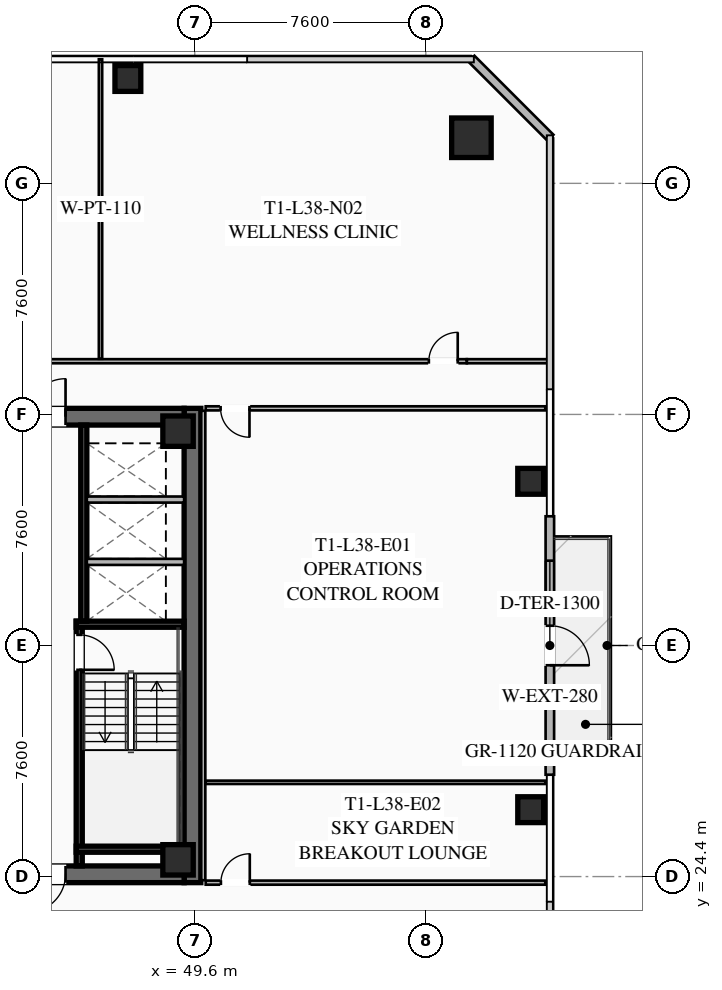
"""IFC4 building model, lengths in metres.
Left out: names, types, materials, properties, quantities, classifications, styles, units other than length and angle.
Written with IfcOpenShell. Run it as: python <this file> out.ifc"""

import sys

from ifc_helpers import new_model, si_unit, direction, frame, frame_2d, origin, origin_2d, place, context, subcontext, project, spatial, rectangle, hollow_rectangle, extrude, element, fill, save


model = new_model("IFC4")
c1 = context("Model", 3, precision=1e-05, world=origin(), true_north=direction((0.0, 1.0)))
c2 = subcontext(c1, "Body", "Model", "MODEL_VIEW")
j1 = project(units=[si_unit("LENGTHUNIT", "METRE"), si_unit("PLANEANGLEUNIT", "RADIAN")], contexts=[c1])
p1 = place(None, origin())
s1 = spatial("IfcSite", under=j1, at=p1, CompositionType="ELEMENT")
p2 = place(p1, origin())
s2 = spatial("IfcBuilding", under=s1, at=p2, CompositionType="ELEMENT")
p3 = place(p2, frame((0.0, 0.0, 142.8)))
s3 = spatial("IfcBuildingStorey", under=s2, at=p3, CompositionType="ELEMENT", Elevation=142.8)
p4 = place(p3, frame((49.525, 39.8, 0.0), z_axis=(0.0, 0.0, 1.0), x_axis=(0.0, -1.0, 0.0)))
e1 = element("IfcWall", 1, at=p4, inside=s3, PredefinedType="SHEAR", context=c2, shape_type="SweptSolid", body=[
    extrude(rectangle(XDim=15.6, YDim=0.55, at=frame_2d((7.8, 0.0))), origin(), (0.0, 0.0, 1.0), 3.55),
])
p5 = place(p3, frame((49.25, 24.475, 0.0), z_axis=(0.0, 0.0, 1.0), x_axis=(-1.0, 0.0, 0.0)))
e2 = element("IfcWall", 2, at=p5, inside=s3, PredefinedType="SHEAR", context=c2, shape_type="SweptSolid", body=[
    extrude(rectangle(XDim=14.5, YDim=0.55, at=frame_2d((7.25, 0.0))), origin(), (0.0, 0.0, 1.0), 3.55),
])
p6 = place(p5, frame((8.95, 0.0, 0.0)))
e3 = element("IfcOpeningElement", 3, at=p6, cuts=e2, PredefinedType="OPENING", context=c2, shape_type="SweptSolid", body=[
    extrude(rectangle(XDim=1.25, YDim=2.25, at=frame_2d((0.625, 1.125))), frame((0.0, 0.285, 0.0), z_axis=(0.0, -1.0, 0.0), x_axis=(1.0, 0.0, 0.0)), (0.0, 0.0, 1.0), 0.57),
])
p7 = place(p5, frame((3.9, 0.0, 0.0)))
e4 = element("IfcOpeningElement", 4, at=p7, cuts=e2, PredefinedType="OPENING", context=c2, shape_type="SweptSolid", body=[
    extrude(rectangle(XDim=1.25, YDim=2.25, at=frame_2d((0.625, 1.125))), frame((0.0, 0.285, 0.0), z_axis=(0.0, -1.0, 0.0), x_axis=(1.0, 0.0, 0.0)), (0.0, 0.0, 1.0), 0.57),
])
p8 = place(p3, frame((34.75, 39.525, 0.0), z_axis=(0.0, 0.0, 1.0), x_axis=(1.0, 0.0, 0.0)))
e5 = element("IfcWall", 5, at=p8, inside=s3, PredefinedType="SHEAR", context=c2, shape_type="SweptSolid", body=[
    extrude(rectangle(XDim=14.5, YDim=0.55, at=frame_2d((7.25, 0.0))), origin(), (0.0, 0.0, 1.0), 3.55),
])
p9 = place(p8, frame((4.3, 0.0, 0.0)))
e6 = element("IfcOpeningElement", 6, at=p9, cuts=e5, PredefinedType="OPENING", context=c2, shape_type="SweptSolid", body=[
    extrude(rectangle(XDim=1.25, YDim=2.25, at=frame_2d((0.625, 1.125))), frame((0.0, 0.285, 0.0), z_axis=(0.0, -1.0, 0.0), x_axis=(1.0, 0.0, 0.0)), (0.0, 0.0, 1.0), 0.57),
])
p10 = place(p8, frame((9.35, 0.0, 0.0)))
e7 = element("IfcOpeningElement", 7, at=p10, cuts=e5, PredefinedType="OPENING", context=c2, shape_type="SweptSolid", body=[
    extrude(rectangle(XDim=1.25, YDim=2.25, at=frame_2d((0.625, 1.125))), frame((0.0, 0.285, 0.0), z_axis=(0.0, -1.0, 0.0), x_axis=(1.0, 0.0, 0.0)), (0.0, 0.0, 1.0), 0.57),
])
for number, where, z_axis, x_axis in (
    (8, (49.05, 24.95, 0.0), (0.0, 0.0, 1.0), (1.0, 0.0, 0.0)),
    (9, (49.05, 39.05, 0.0), (0.0, 0.0, 1.0), (1.0, 0.0, 0.0)),
):
    element("IfcColumn", number, at=place(p3, frame(where, z_axis=z_axis, x_axis=x_axis)), inside=s3, PredefinedType="COLUMN", context=c2, shape_type="SweptSolid", body=[
        extrude(hollow_rectangle(XDim=1.0, YDim=1.0, WallThickness=0.04, at=origin_2d()), origin(), (0.0, 0.0, 1.0), 3.37),
    ])
p11 = place(p3, frame((58.7, 48.7, 0.0), z_axis=(0.0, 0.0, 1.0), x_axis=(1.0, 0.0, 0.0)))
e10 = element("IfcColumn", 10, at=p11, inside=s3, PredefinedType="COLUMN", context=c2, shape_type="SweptSolid", body=[
    extrude(hollow_rectangle(XDim=1.3, YDim=1.3, WallThickness=0.05, at=origin_2d()), origin(), (0.0, 0.0, 1.0), 3.37),
])
for number, where, z_axis, x_axis in (
    (11, (60.65, 26.6, 0.0), (0.0, 0.0, 1.0), (1.0, 0.0, 0.0)),
    (12, (60.65, 37.4, 0.0), (0.0, 0.0, 1.0), (1.0, 0.0, 0.0)),
    (13, (47.4, 50.65, 0.0), (0.0, 0.0, 1.0), (1.0, 0.0, 0.0)),
):
    element("IfcColumn", number, at=place(p3, frame(where, z_axis=z_axis, x_axis=x_axis)), inside=s3, PredefinedType="COLUMN", context=c2, shape_type="SweptSolid", body=[
        extrude(hollow_rectangle(XDim=0.85, YDim=0.85, WallThickness=0.035, at=origin_2d()), origin(), (0.0, 0.0, 1.0), 3.37),
    ])
p12 = place(p3, frame((61.28, 36.25, 0.0), z_axis=(0.0, 0.0, 1.0), x_axis=(0.0, -1.0, 0.0)))
e14 = element("IfcWall", 14, at=p12, inside=s3, PredefinedType="SOLIDWALL", context=c2, shape_type="SweptSolid", body=[
    extrude(rectangle(XDim=8.5, YDim=0.28, at=frame_2d((4.25, 0.0))), origin(), (0.0, 0.0, 1.0), 3.37),
])
p13 = place(p12, frame((3.6, 0.0, 0.0)))
e15 = element("IfcOpeningElement", 15, at=p13, cuts=e14, PredefinedType="OPENING", context=c2, shape_type="SweptSolid", body=[
    extrude(rectangle(XDim=1.3, YDim=2.15, at=frame_2d((0.65, 1.075))), frame((0.0, 0.15, 0.0), z_axis=(0.0, -1.0, 0.0), x_axis=(1.0, 0.0, 0.0)), (0.0, 0.0, 1.0), 0.3),
])
p14 = place(p12, frame((1.46, 0.0, 0.85)))
e16 = element("IfcOpeningElement", 16, at=p14, cuts=e14, PredefinedType="OPENING", context=c2, shape_type="SweptSolid", body=[
    extrude(rectangle(XDim=1.8, YDim=1.92, at=frame_2d((0.9, 0.96))), frame((0.0, 0.15, 0.0), z_axis=(0.0, -1.0, 0.0), x_axis=(1.0, 0.0, 0.0)), (0.0, 0.0, 1.0), 0.3),
])
p15 = place(p3, frame((58.7, 51.3, 0.0), z_axis=(0.0, 0.0, 1.0), x_axis=(0.707106781187, -0.707106781187, 0.0)))
e17 = element("IfcWall", 17, at=p15, inside=s3, PredefinedType="SOLIDWALL", context=c2, shape_type="SweptSolid", body=[
    extrude(rectangle(XDim=3.677, YDim=0.28, at=frame_2d((1.838, 0.0))), origin(), (0.0, 0.0, 1.0), 3.37),
])
p16 = place(p3, frame((45.8, 32.8, 0.0), z_axis=(0.0, 0.0, 1.0), x_axis=(0.0, -1.0, 0.0)))
e18 = element("IfcWall", 18, at=p16, inside=s3, PredefinedType="SHEAR", context=c2, shape_type="SweptSolid", body=[
    extrude(rectangle(XDim=8.05, YDim=0.2, at=frame_2d((4.025, 0.0))), origin(), (0.0, 0.0, 1.0), 3.37),
])
p17 = place(p16, frame((0.45, 0.0, 0.0)))
e19 = element("IfcOpeningElement", 19, at=p17, cuts=e18, PredefinedType="OPENING", context=c2, shape_type="SweptSolid", body=[
    extrude(rectangle(XDim=1.15, YDim=2.2, at=frame_2d((0.575, 1.1))), frame((0.0, 0.11, 0.0), z_axis=(0.0, -1.0, 0.0), x_axis=(1.0, 0.0, 0.0)), (0.0, 0.0, 1.0), 0.22),
])
for number, where, z_axis, x_axis in (
    (20, (45.7, 32.7, 0.0), (0.0, 0.0, 1.0), (1.0, 0.0, 0.0)),
    (21, (45.7, 25.3, 0.0), (0.0, 0.0, 1.0), (1.0, 0.0, 0.0)),
):
    element("IfcWall", number, at=place(p3, frame(where, z_axis=z_axis, x_axis=x_axis)), inside=s3, PredefinedType="SHEAR", context=c2, shape_type="SweptSolid", body=[
        extrude(rectangle(XDim=3.55, YDim=0.2, at=frame_2d((1.775, 0.0))), origin(), (0.0, 0.0, 1.0), 3.37),
    ])
p18 = place(p3, frame((45.95, 39.25, 0.0), z_axis=(0.0, 0.0, 1.0), x_axis=(0.0, -1.0, 0.0)))
e22 = element("IfcWall", 22, at=p18, inside=s3, PredefinedType="SHEAR", context=c2, shape_type="SweptSolid", body=[
    extrude(rectangle(XDim=6.45, YDim=0.2, at=frame_2d((3.225, 0.0))), origin(), (0.0, 0.0, 1.0), 3.37),
])
for number, where, z_axis, x_axis in (
    (23, (46.05, 34.75, 0.0), (0.0, 0.0, 1.0), (1.0, 0.0, 0.0)),
    (24, (46.05, 36.8, 0.0), (0.0, 0.0, 1.0), (1.0, 0.0, 0.0)),
):
    element("IfcWall", number, at=place(p3, frame(where, z_axis=z_axis, x_axis=x_axis)), inside=s3, PredefinedType="SOLIDWALL", context=c2, shape_type="SweptSolid", body=[
        extrude(rectangle(XDim=3.2, YDim=0.2, at=frame_2d((1.6, 0.0))), origin(), (0.0, 0.0, 1.0), 3.37),
    ])
p19 = place(p3, frame((25.45, 41.35, 0.0), z_axis=(0.0, 0.0, 1.0), x_axis=(1.0, 0.0, 0.0)))
e25 = element("IfcWall", 25, at=p19, inside=s3, PredefinedType="PARTITIONING", context=c2, shape_type="SweptSolid", body=[
    extrude(rectangle(XDim=33.1, YDim=0.135, at=frame_2d((16.55, 0.0))), origin(), (0.0, 0.0, 1.0), 2.723),
])
p20 = place(p19, frame((0.3, 0.0, 0.0)))
e26 = element("IfcOpeningElement", 26, at=p20, cuts=e25, PredefinedType="OPENING", context=c2, shape_type="SweptSolid", body=[
    extrude(rectangle(XDim=0.95, YDim=2.05, at=frame_2d((0.475, 1.025))), frame((0.0, 0.077, 0.0), z_axis=(0.0, -1.0, 0.0), x_axis=(1.0, 0.0, 0.0)), (0.0, 0.0, 1.0), 0.155),
])
p21 = place(p19, frame((31.85, 0.0, 0.0)))
e27 = element("IfcOpeningElement", 27, at=p21, cuts=e25, PredefinedType="OPENING", context=c2, shape_type="SweptSolid", body=[
    extrude(rectangle(XDim=0.95, YDim=2.05, at=frame_2d((0.475, 1.025))), frame((0.0, 0.077, 0.0), z_axis=(0.0, -1.0, 0.0), x_axis=(1.0, 0.0, 0.0)), (0.0, 0.0, 1.0), 0.155),
])
p22 = place(p3, frame((58.55, 41.35, 0.0), z_axis=(0.0, 0.0, 1.0), x_axis=(1.0, 0.0, 0.0)))
e28 = element("IfcWall", 28, at=p22, inside=s3, PredefinedType="PARTITIONING", context=c2, shape_type="SweptSolid", body=[
    extrude(rectangle(XDim=2.73, YDim=0.135, at=frame_2d((1.365, 0.0))), origin(), (0.0, 0.0, 1.0), 2.723),
])
p23 = place(p3, frame((46.5, 41.43, 0.0), z_axis=(0.0, 0.0, 1.0), x_axis=(0.0, 1.0, 0.0)))
e29 = element("IfcWall", 29, at=p23, inside=s3, PredefinedType="PARTITIONING", context=c2, shape_type="SweptSolid", body=[
    extrude(rectangle(XDim=9.85, YDim=0.11, at=frame_2d((4.925, 0.0))), origin(), (0.0, 0.0, 1.0), 2.723),
])
p24 = place(p3, frame((49.88, 39.72, 0.0), z_axis=(0.0, 0.0, 1.0), x_axis=(0.0, -1.0, 0.0)))
e30 = element("IfcWall", 30, at=p24, inside=s3, PredefinedType="PARTITIONING", context=c2, shape_type="SweptSolid", body=[
    extrude(rectangle(XDim=15.44, YDim=0.135, at=frame_2d((7.72, 0.0))), origin(), (0.0, 0.0, 1.0), 2.723),
])
p25 = place(p3, frame((61.13, 39.8, 0.0), z_axis=(0.0, 0.0, 1.0), x_axis=(-1.0, 0.0, 0.0)))
e31 = element("IfcWall", 31, at=p25, inside=s3, PredefinedType="PARTITIONING", context=c2, shape_type="SweptSolid", body=[
    extrude(rectangle(XDim=11.17, YDim=0.135, at=frame_2d((5.585, 0.0))), origin(), (0.0, 0.0, 1.0), 2.723),
])
p26 = place(p25, frame((9.73, 0.0, 0.0)))
e32 = element("IfcOpeningElement", 32, at=p26, cuts=e31, PredefinedType="OPENING", context=c2, shape_type="SweptSolid", body=[
    extrude(rectangle(XDim=0.95, YDim=2.05, at=frame_2d((0.475, 1.025))), frame((0.0, 0.077, 0.0), z_axis=(0.0, -1.0, 0.0), x_axis=(1.0, 0.0, 0.0)), (0.0, 0.0, 1.0), 0.155),
])
p27 = place(p3, frame((49.96, 24.2, 0.0), z_axis=(0.0, 0.0, 1.0), x_axis=(1.0, 0.0, 0.0)))
e33 = element("IfcWall", 33, at=p27, inside=s3, PredefinedType="PARTITIONING", context=c2, shape_type="SweptSolid", body=[
    extrude(rectangle(XDim=11.17, YDim=0.135, at=frame_2d((5.585, 0.0))), origin(), (0.0, 0.0, 1.0), 2.723),
])
p28 = place(p27, frame((0.5, 0.0, 0.0)))
e34 = element("IfcOpeningElement", 34, at=p28, cuts=e33, PredefinedType="OPENING", context=c2, shape_type="SweptSolid", body=[
    extrude(rectangle(XDim=0.95, YDim=2.05, at=frame_2d((0.475, 1.025))), frame((0.0, 0.077, 0.0), z_axis=(0.0, -1.0, 0.0), x_axis=(1.0, 0.0, 0.0)), (0.0, 0.0, 1.0), 0.155),
])
p29 = place(p3, frame((49.96, 27.5, 0.0), z_axis=(0.0, 0.0, 1.0), x_axis=(1.0, 0.0, 0.0)))
e35 = element("IfcWall", 35, at=p29, inside=s3, PredefinedType="PARTITIONING", context=c2, shape_type="SweptSolid", body=[
    extrude(rectangle(XDim=11.17, YDim=0.11, at=frame_2d((5.585, 0.0))), origin(), (0.0, 0.0, 1.0), 2.723),
])
p30 = place(p13, origin())
e36 = element("IfcDoor", 36, at=p30, inside=s3, OperationType="SINGLE_SWING_RIGHT", PredefinedType="DOOR", context=c2, shape_type="SweptSolid", body=[
    extrude(rectangle(XDim=1.3, YDim=2.15, at=frame_2d((0.65, 1.075))), frame((0.0, 0.025, 0.0), z_axis=(0.0, -1.0, 0.0), x_axis=(1.0, 0.0, 0.0)), (0.0, 0.0, 1.0), 0.05),
])
fill(e15, e36)
p31 = place(p14, origin())
e37 = element("IfcWindow", 37, at=p31, inside=s3, PartitioningType="SINGLE_PANEL", PredefinedType="WINDOW", context=c2, shape_type="SweptSolid", body=[
    extrude(rectangle(XDim=1.8, YDim=1.92, at=frame_2d((0.9, 0.96))), frame((0.0, 0.03, 0.0), z_axis=(0.0, -1.0, 0.0), x_axis=(1.0, 0.0, 0.0)), (0.0, 0.0, 1.0), 0.06),
])
fill(e16, e37)
p32 = place(p10, origin())
e38 = element("IfcDoor", 38, at=p32, inside=s3, OperationType="SINGLE_SWING_RIGHT", PredefinedType="DOOR", context=c2, shape_type="SweptSolid", body=[
    extrude(rectangle(XDim=1.25, YDim=2.25, at=frame_2d((0.625, 1.125))), frame((0.0, 0.025, 0.0), z_axis=(0.0, -1.0, 0.0), x_axis=(1.0, 0.0, 0.0)), (0.0, 0.0, 1.0), 0.05),
])
fill(e7, e38)
p33 = place(p7, origin())
e39 = element("IfcDoor", 39, at=p33, inside=s3, OperationType="SINGLE_SWING_RIGHT", PredefinedType="DOOR", context=c2, shape_type="SweptSolid", body=[
    extrude(rectangle(XDim=1.25, YDim=2.25, at=frame_2d((0.625, 1.125))), frame((0.0, 0.025, 0.0), z_axis=(0.0, -1.0, 0.0), x_axis=(1.0, 0.0, 0.0)), (0.0, 0.0, 1.0), 0.05),
])
fill(e4, e39)
p34 = place(p17, origin())
e40 = element("IfcDoor", 40, at=p34, inside=s3, OperationType="SINGLE_SWING_RIGHT", PredefinedType="DOOR", context=c2, shape_type="SweptSolid", body=[
    extrude(rectangle(XDim=1.15, YDim=2.2, at=frame_2d((0.575, 1.1))), frame((0.0, 0.025, 0.0), z_axis=(0.0, -1.0, 0.0), x_axis=(1.0, 0.0, 0.0)), (0.0, 0.0, 1.0), 0.05),
])
fill(e19, e40)
p35 = place(p21, origin())
e41 = element("IfcDoor", 41, at=p35, inside=s3, OperationType="SINGLE_SWING_RIGHT", PredefinedType="DOOR", context=c2, shape_type="SweptSolid", body=[
    extrude(rectangle(XDim=0.95, YDim=2.05, at=frame_2d((0.475, 1.025))), frame((0.0, 0.025, 0.0), z_axis=(0.0, -1.0, 0.0), x_axis=(1.0, 0.0, 0.0)), (0.0, 0.0, 1.0), 0.05),
])
fill(e27, e41)
p36 = place(p26, origin())
e42 = element("IfcDoor", 42, at=p36, inside=s3, OperationType="SINGLE_SWING_LEFT", PredefinedType="DOOR", context=c2, shape_type="SweptSolid", body=[
    extrude(rectangle(XDim=0.95, YDim=2.05, at=frame_2d((0.475, 1.025))), frame((0.0, 0.025, 0.0), z_axis=(0.0, -1.0, 0.0), x_axis=(1.0, 0.0, 0.0)), (0.0, 0.0, 1.0), 0.05),
])
fill(e32, e42)
p37 = place(p28, origin())
e43 = element("IfcDoor", 43, at=p37, inside=s3, OperationType="SINGLE_SWING_RIGHT", PredefinedType="DOOR", context=c2, shape_type="SweptSolid", body=[
    extrude(rectangle(XDim=0.95, YDim=2.05, at=frame_2d((0.475, 1.025))), frame((0.0, 0.025, 0.0), z_axis=(0.0, -1.0, 0.0), x_axis=(1.0, 0.0, 0.0)), (0.0, 0.0, 1.0), 0.05),
])
fill(e34, e43)
save(model, sys.argv[1])
